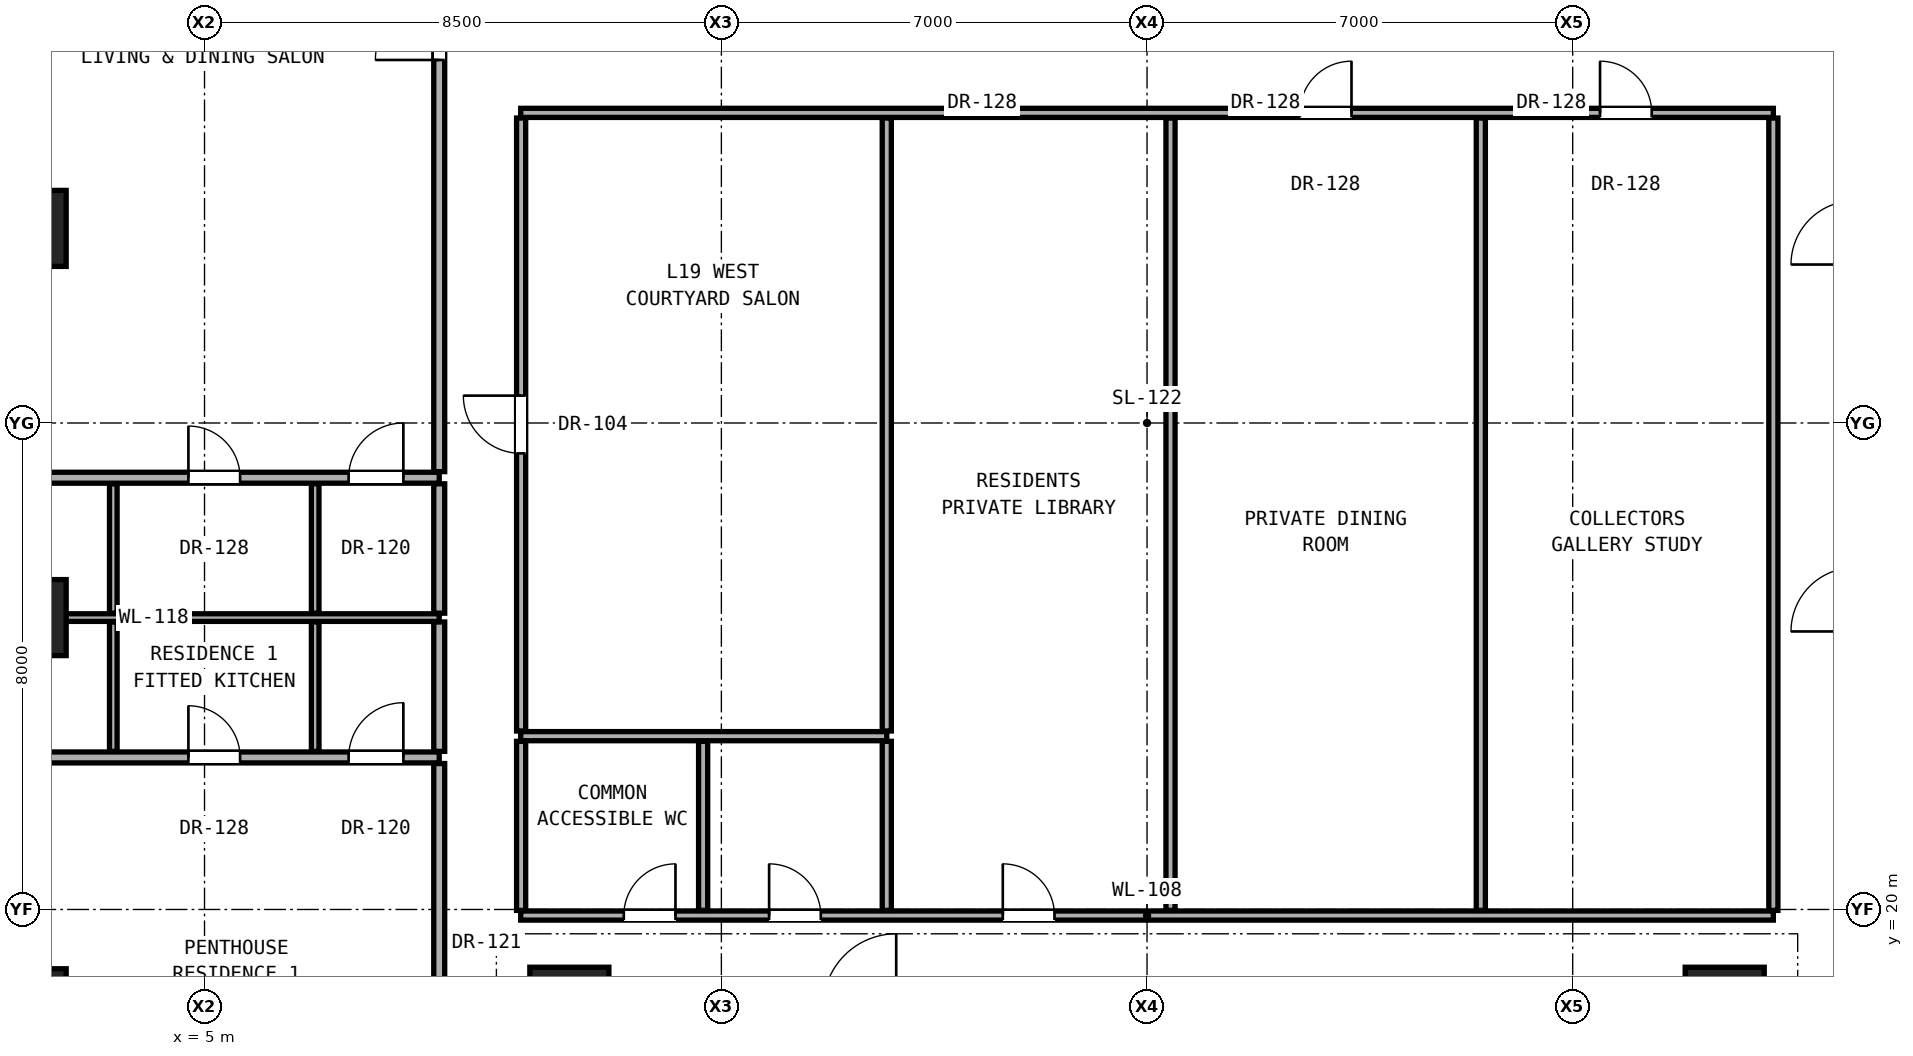
"""IFC4 building model, lengths in metres.
Left out: names, types, materials, properties, quantities, classifications, styles, units other than length and angle.
Written with IfcOpenShell. Run it as: python <this file> out.ifc"""

import sys

from ifc_helpers import new_model, si_unit, direction, frame, frame_2d, origin, origin_2d, place, context, subcontext, project, spatial, rectangle, hollow_rectangle, extrude, element, fill, save


model = new_model("IFC4")
c1 = context("Model", 3, precision=1e-05, world=origin(), true_north=direction((0.0, 1.0)))
c2 = subcontext(c1, "Body", "Model", "MODEL_VIEW")
j1 = project(units=[si_unit("LENGTHUNIT", "METRE"), si_unit("PLANEANGLEUNIT", "RADIAN")], contexts=[c1])
p1 = place(None, origin())
s1 = spatial("IfcSite", under=j1, at=p1, CompositionType="ELEMENT")
p2 = place(p1, origin())
s2 = spatial("IfcBuilding", under=s1, at=p2, CompositionType="ELEMENT")
p3 = place(p2, frame((0.0, 0.0, 68.6)))
s3 = spatial("IfcBuildingStorey", under=s2, at=p3, CompositionType="ELEMENT", Elevation=68.6)
for number, where, z_axis, x_axis in (
    (1, (11.0, 18.4, 0.0), (0.0, 0.0, 1.0), (1.0, 0.0, 0.0)),
    (2, (30.0, 18.4, 0.0), (0.0, 0.0, 1.0), (1.0, 0.0, 0.0)),
):
    element("IfcColumn", number, at=place(p3, frame(where, z_axis=z_axis, x_axis=x_axis)), inside=s3, PredefinedType="COLUMN", context=c2, shape_type="SweptSolid", body=[
        extrude(rectangle(XDim=1.3, YDim=1.3, at=origin_2d()), origin(), (0.0, 0.0, 1.0), 3.3),
    ])
for number, where, z_axis, x_axis in (
    (3, (2.1, 18.4, 0.0), (0.0, 0.0, 1.0), (1.0, 0.0, 0.0)),
    (4, (2.1, 24.8, 0.0), (0.0, 0.0, 1.0), (1.0, 0.0, 0.0)),
    (5, (2.1, 31.2, 0.0), (0.0, 0.0, 1.0), (1.0, 0.0, 0.0)),
):
    element("IfcColumn", number, at=place(p3, frame(where, z_axis=z_axis, x_axis=x_axis)), inside=s3, PredefinedType="COLUMN", context=c2, shape_type="SweptSolid", body=[
        extrude(hollow_rectangle(XDim=1.25, YDim=1.25, WallThickness=0.07, at=origin_2d()), origin(), (0.0, 0.0, 1.0), 3.3),
    ])
p4 = place(p3, frame((10.2, 19.9, 0.0), z_axis=(0.0, 0.0, 1.0), x_axis=(1.0, 0.0, 0.0)))
e6 = element("IfcWall", 6, at=p4, inside=s3, PredefinedType="PARTITIONING", context=c2, shape_type="SweptSolid", body=[
    extrude(rectangle(XDim=20.6, YDim=0.15, at=frame_2d((10.3, 0.0))), origin(), (0.0, 0.0, 1.0), 2.104),
])
p5 = place(p4, frame((1.695, 0.0, 0.0)))
e7 = element("IfcOpeningElement", 7, at=p5, cuts=e6, PredefinedType="OPENING", context=c2, shape_type="SweptSolid", body=[
    extrude(rectangle(XDim=0.85, YDim=2.01, at=frame_2d((0.425, 1.005))), frame((0.0, 0.085, 0.0), z_axis=(0.0, -1.0, 0.0), x_axis=(1.0, 0.0, 0.0)), (0.0, 0.0, 1.0), 0.17),
])
p6 = place(p4, frame((4.085, 0.0, 0.0)))
e8 = element("IfcOpeningElement", 8, at=p6, cuts=e6, PredefinedType="OPENING", context=c2, shape_type="SweptSolid", body=[
    extrude(rectangle(XDim=0.85, YDim=2.01, at=frame_2d((0.425, 1.005))), frame((0.0, 0.085, 0.0), z_axis=(0.0, -1.0, 0.0), x_axis=(1.0, 0.0, 0.0)), (0.0, 0.0, 1.0), 0.17),
])
p7 = place(p4, frame((7.928, 0.0, 0.0)))
e9 = element("IfcOpeningElement", 9, at=p7, cuts=e6, PredefinedType="OPENING", context=c2, shape_type="SweptSolid", body=[
    extrude(rectangle(XDim=0.85, YDim=2.01, at=frame_2d((0.425, 1.005))), frame((0.0, 0.085, 0.0), z_axis=(0.0, -1.0, 0.0), x_axis=(1.0, 0.0, 0.0)), (0.0, 0.0, 1.0), 0.17),
])
p8 = place(p3, frame((-1.48, 22.5, 0.0), z_axis=(0.0, 0.0, 1.0), x_axis=(1.0, 0.0, 0.0)))
e10 = element("IfcWall", 10, at=p8, inside=s3, PredefinedType="PARTITIONING", context=c2, shape_type="SweptSolid", body=[
    extrude(rectangle(XDim=10.34, YDim=0.18, at=frame_2d((5.17, 0.0))), origin(), (0.0, 0.0, 1.0), 2.125),
])
p9 = place(p8, frame((2.085, 0.0, 0.0)))
e11 = element("IfcOpeningElement", 11, at=p9, cuts=e10, PredefinedType="OPENING", context=c2, shape_type="SweptSolid", body=[
    extrude(rectangle(XDim=0.85, YDim=2.01, at=frame_2d((0.425, 1.005))), frame((0.0, 0.1, 0.0), z_axis=(0.0, -1.0, 0.0), x_axis=(1.0, 0.0, 0.0)), (0.0, 0.0, 1.0), 0.2),
])
p10 = place(p8, frame((6.215, 0.0, 0.0)))
e12 = element("IfcOpeningElement", 12, at=p10, cuts=e10, PredefinedType="OPENING", context=c2, shape_type="SweptSolid", body=[
    extrude(rectangle(XDim=0.85, YDim=2.01, at=frame_2d((0.425, 1.005))), frame((0.0, 0.1, 0.0), z_axis=(0.0, -1.0, 0.0), x_axis=(1.0, 0.0, 0.0)), (0.0, 0.0, 1.0), 0.2),
])
p11 = place(p8, frame((8.85, 0.0, 0.0)))
e13 = element("IfcOpeningElement", 13, at=p11, cuts=e10, PredefinedType="OPENING", context=c2, shape_type="SweptSolid", body=[
    extrude(rectangle(XDim=0.9, YDim=2.1, at=frame_2d((0.45, 1.05))), frame((0.0, 0.1, 0.0), z_axis=(0.0, -1.0, 0.0), x_axis=(1.0, 0.0, 0.0)), (0.0, 0.0, 1.0), 0.2),
])
p12 = place(p3, frame((10.2, 22.85, 0.0), z_axis=(0.0, 0.0, 1.0), x_axis=(1.0, 0.0, 0.0)))
e14 = element("IfcWall", 14, at=p12, inside=s3, PredefinedType="PARTITIONING", context=c2, shape_type="SweptSolid", body=[
    extrude(rectangle(XDim=6.02, YDim=0.15, at=frame_2d((3.01, 0.0))), origin(), (0.0, 0.0, 1.0), 2.104),
])
p13 = place(p3, frame((-1.48, 24.8, 0.0), z_axis=(0.0, 0.0, 1.0), x_axis=(1.0, 0.0, 0.0)))
e15 = element("IfcWall", 15, at=p13, inside=s3, PredefinedType="PARTITIONING", context=c2, shape_type="SweptSolid", body=[
    extrude(rectangle(XDim=10.34, YDim=0.125, at=frame_2d((5.17, 0.0))), origin(), (0.0, 0.0, 1.0), 2.125),
])
p14 = place(p3, frame((-1.48, 27.1, 0.0), z_axis=(0.0, 0.0, 1.0), x_axis=(1.0, 0.0, 0.0)))
e16 = element("IfcWall", 16, at=p14, inside=s3, PredefinedType="PARTITIONING", context=c2, shape_type="SweptSolid", body=[
    extrude(rectangle(XDim=10.34, YDim=0.18, at=frame_2d((5.17, 0.0))), origin(), (0.0, 0.0, 1.0), 2.125),
])
p15 = place(p14, frame((2.085, 0.0, 0.0)))
e17 = element("IfcOpeningElement", 17, at=p15, cuts=e16, PredefinedType="OPENING", context=c2, shape_type="SweptSolid", body=[
    extrude(rectangle(XDim=0.85, YDim=2.01, at=frame_2d((0.425, 1.005))), frame((0.0, 0.1, 0.0), z_axis=(0.0, -1.0, 0.0), x_axis=(1.0, 0.0, 0.0)), (0.0, 0.0, 1.0), 0.2),
])
p16 = place(p14, frame((6.215, 0.0, 0.0)))
e18 = element("IfcOpeningElement", 18, at=p16, cuts=e16, PredefinedType="OPENING", context=c2, shape_type="SweptSolid", body=[
    extrude(rectangle(XDim=0.85, YDim=2.01, at=frame_2d((0.425, 1.005))), frame((0.0, 0.1, 0.0), z_axis=(0.0, -1.0, 0.0), x_axis=(1.0, 0.0, 0.0)), (0.0, 0.0, 1.0), 0.2),
])
p17 = place(p14, frame((8.85, 0.0, 0.0)))
e19 = element("IfcOpeningElement", 19, at=p17, cuts=e16, PredefinedType="OPENING", context=c2, shape_type="SweptSolid", body=[
    extrude(rectangle(XDim=0.9, YDim=2.1, at=frame_2d((0.45, 1.05))), frame((0.0, 0.1, 0.0), z_axis=(0.0, -1.0, 0.0), x_axis=(1.0, 0.0, 0.0)), (0.0, 0.0, 1.0), 0.2),
])
p18 = place(p3, frame((10.2, 33.1, 0.0), z_axis=(0.0, 0.0, 1.0), x_axis=(1.0, 0.0, 0.0)))
e20 = element("IfcWall", 20, at=p18, inside=s3, PredefinedType="PARTITIONING", context=c2, shape_type="SweptSolid", body=[
    extrude(rectangle(XDim=20.6, YDim=0.15, at=frame_2d((10.3, 0.0))), origin(), (0.0, 0.0, 1.0), 2.104),
])
p19 = place(p18, frame((12.812, 0.0, 0.0)))
e21 = element("IfcOpeningElement", 21, at=p19, cuts=e20, PredefinedType="OPENING", context=c2, shape_type="SweptSolid", body=[
    extrude(rectangle(XDim=0.85, YDim=2.01, at=frame_2d((0.425, 1.005))), frame((0.0, 0.085, 0.0), z_axis=(0.0, -1.0, 0.0), x_axis=(1.0, 0.0, 0.0)), (0.0, 0.0, 1.0), 0.17),
])
p20 = place(p18, frame((17.75, 0.0, 0.0)))
e22 = element("IfcOpeningElement", 22, at=p20, cuts=e20, PredefinedType="OPENING", context=c2, shape_type="SweptSolid", body=[
    extrude(rectangle(XDim=0.85, YDim=2.01, at=frame_2d((0.425, 1.005))), frame((0.0, 0.085, 0.0), z_axis=(0.0, -1.0, 0.0), x_axis=(1.0, 0.0, 0.0)), (0.0, 0.0, 1.0), 0.17),
])
for number, where, z_axis, x_axis in (
    (23, (3.5, 22.6, 0.0), (0.0, 0.0, 1.0), (0.0, 1.0, 0.0)),
    (24, (3.5, 24.873, 0.0), (0.0, 0.0, 1.0), (0.0, 1.0, 0.0)),
    (25, (6.82, 22.6, 0.0), (0.0, 0.0, 1.0), (0.0, 1.0, 0.0)),
    (26, (6.82, 24.873, 0.0), (0.0, 0.0, 1.0), (0.0, 1.0, 0.0)),
):
    element("IfcWall", number, at=place(p3, frame(where, z_axis=z_axis, x_axis=x_axis)), inside=s3, PredefinedType="PARTITIONING", context=c2, shape_type="SweptSolid", body=[
        extrude(rectangle(XDim=2.127, YDim=0.125, at=frame_2d((1.064, 0.0))), origin(), (0.0, 0.0, 1.0), 2.279),
    ])
p21 = place(p3, frame((8.86, 14.21, 0.0), z_axis=(0.0, 0.0, 1.0), x_axis=(0.0, 1.0, 0.0)))
e27 = element("IfcWall", 27, at=p21, inside=s3, PredefinedType="PARTITIONING", context=c2, shape_type="SweptSolid", body=[
    extrude(rectangle(XDim=8.19, YDim=0.18, at=frame_2d((4.095, 0.0))), origin(), (0.0, 0.0, 1.0), 2.436),
])
p22 = place(p21, frame((3.57, 0.0, 0.0)))
e28 = element("IfcOpeningElement", 28, at=p22, cuts=e27, PredefinedType="OPENING", context=c2, shape_type="SweptSolid", body=[
    extrude(rectangle(XDim=1.05, YDim=2.2, at=frame_2d((0.525, 1.1))), frame((0.0, 0.1, 0.0), z_axis=(0.0, -1.0, 0.0), x_axis=(1.0, 0.0, 0.0)), (0.0, 0.0, 1.0), 0.2),
])
for number, where, z_axis, x_axis in (
    (29, (8.86, 22.6, 0.0), (0.0, 0.0, 1.0), (0.0, 1.0, 0.0)),
    (30, (8.86, 24.873, 0.0), (0.0, 0.0, 1.0), (0.0, 1.0, 0.0)),
):
    element("IfcWall", number, at=place(p3, frame(where, z_axis=z_axis, x_axis=x_axis)), inside=s3, PredefinedType="PARTITIONING", context=c2, shape_type="SweptSolid", body=[
        extrude(rectangle(XDim=2.127, YDim=0.18, at=frame_2d((1.064, 0.0))), origin(), (0.0, 0.0, 1.0), 2.279),
    ])
p23 = place(p3, frame((8.86, 27.2, 0.0), z_axis=(0.0, 0.0, 1.0), x_axis=(0.0, 1.0, 0.0)))
e31 = element("IfcWall", 31, at=p23, inside=s3, PredefinedType="PARTITIONING", context=c2, shape_type="SweptSolid", body=[
    extrude(rectangle(XDim=14.59, YDim=0.18, at=frame_2d((7.295, 0.0))), origin(), (0.0, 0.0, 1.0), 2.279),
])
p24 = place(p23, frame((6.77, 0.0, 0.0)))
e32 = element("IfcOpeningElement", 32, at=p24, cuts=e31, PredefinedType="OPENING", context=c2, shape_type="SweptSolid", body=[
    extrude(rectangle(XDim=1.05, YDim=2.2, at=frame_2d((0.525, 1.1))), frame((0.0, 0.1, 0.0), z_axis=(0.0, -1.0, 0.0), x_axis=(1.0, 0.0, 0.0)), (0.0, 0.0, 1.0), 0.2),
])
p25 = place(p3, frame((10.207, 19.985, 0.0), z_axis=(0.0, 0.0, 1.0), x_axis=(0.0, 1.0, 0.0)))
e33 = element("IfcWall", 33, at=p25, inside=s3, PredefinedType="PARTITIONING", context=c2, shape_type="SweptSolid", body=[
    extrude(rectangle(XDim=2.78, YDim=0.15, at=frame_2d((1.39, 0.0))), origin(), (0.0, 0.0, 1.0), 3.06),
])
p26 = place(p3, frame((10.207, 22.935, 0.0), z_axis=(0.0, 0.0, 1.0), x_axis=(0.0, 1.0, 0.0)))
e34 = element("IfcWall", 34, at=p26, inside=s3, PredefinedType="PARTITIONING", context=c2, shape_type="SweptSolid", body=[
    extrude(rectangle(XDim=10.08, YDim=0.15, at=frame_2d((5.04, 0.0))), origin(), (0.0, 0.0, 1.0), 2.279),
])
p27 = place(p26, frame((4.565, 0.0, 0.0)))
e35 = element("IfcOpeningElement", 35, at=p27, cuts=e34, PredefinedType="OPENING", context=c2, shape_type="SweptSolid", body=[
    extrude(rectangle(XDim=0.95, YDim=2.15, at=frame_2d((0.475, 1.075))), frame((0.0, 0.085, 0.0), z_axis=(0.0, -1.0, 0.0), x_axis=(1.0, 0.0, 0.0)), (0.0, 0.0, 1.0), 0.17),
])
for number, where, z_axis, x_axis in (
    (36, (13.2, 19.985, 0.0), (0.0, 0.0, 1.0), (0.0, 1.0, 0.0)),
    (37, (16.22, 19.985, 0.0), (0.0, 0.0, 1.0), (0.0, 1.0, 0.0)),
):
    element("IfcWall", number, at=place(p3, frame(where, z_axis=z_axis, x_axis=x_axis)), inside=s3, PredefinedType="PARTITIONING", context=c2, shape_type="SweptSolid", body=[
        extrude(rectangle(XDim=2.78, YDim=0.15, at=frame_2d((1.39, 0.0))), origin(), (0.0, 0.0, 1.0), 3.06),
    ])
p28 = place(p3, frame((16.22, 22.935, 0.0), z_axis=(0.0, 0.0, 1.0), x_axis=(0.0, 1.0, 0.0)))
e38 = element("IfcWall", 38, at=p28, inside=s3, PredefinedType="PARTITIONING", context=c2, shape_type="SweptSolid", body=[
    extrude(rectangle(XDim=10.08, YDim=0.15, at=frame_2d((5.04, 0.0))), origin(), (0.0, 0.0, 1.0), 2.104),
])
for number, where, z_axis, x_axis in (
    (39, (20.886, 19.985, 0.0), (0.0, 0.0, 1.0), (0.0, 1.0, 0.0)),
    (40, (25.989, 19.985, 0.0), (0.0, 0.0, 1.0), (0.0, 1.0, 0.0)),
):
    element("IfcWall", number, at=place(p3, frame(where, z_axis=z_axis, x_axis=x_axis)), inside=s3, PredefinedType="PARTITIONING", context=c2, shape_type="SweptSolid", body=[
        extrude(rectangle(XDim=13.03, YDim=0.15, at=frame_2d((6.515, 0.0))), origin(), (0.0, 0.0, 1.0), 2.104),
    ])
p29 = place(p3, frame((30.8, 19.985, 0.0), z_axis=(0.0, 0.0, 1.0), x_axis=(0.0, 1.0, 0.0)))
e41 = element("IfcWall", 41, at=p29, inside=s3, PredefinedType="PARTITIONING", context=c2, shape_type="SweptSolid", body=[
    extrude(rectangle(XDim=13.03, YDim=0.15, at=frame_2d((6.515, 0.0))), origin(), (0.0, 0.0, 1.0), 2.279),
])
p30 = place(p5, origin())
e42 = element("IfcDoor", 42, at=p30, inside=s3, OperationType="SINGLE_SWING_RIGHT", PredefinedType="DOOR", context=c2, shape_type="SweptSolid", body=[
    extrude(rectangle(XDim=0.85, YDim=2.01, at=frame_2d((0.425, 1.005))), frame((0.0, 0.025, 0.0), z_axis=(0.0, -1.0, 0.0), x_axis=(1.0, 0.0, 0.0)), (0.0, 0.0, 1.0), 0.05),
])
fill(e7, e42)
p31 = place(p10, origin())
e43 = element("IfcDoor", 43, at=p31, inside=s3, OperationType="SINGLE_SWING_LEFT", PredefinedType="DOOR", context=c2, shape_type="SweptSolid", body=[
    extrude(rectangle(XDim=0.85, YDim=2.01, at=frame_2d((0.425, 1.005))), frame((0.0, 0.025, 0.0), z_axis=(0.0, -1.0, 0.0), x_axis=(1.0, 0.0, 0.0)), (0.0, 0.0, 1.0), 0.05),
])
fill(e12, e43)
p32 = place(p11, origin())
e44 = element("IfcDoor", 44, at=p32, inside=s3, OperationType="SINGLE_SWING_RIGHT", PredefinedType="DOOR", context=c2, shape_type="SweptSolid", body=[
    extrude(rectangle(XDim=0.9, YDim=2.1, at=frame_2d((0.45, 1.05))), frame((0.0, 0.025, 0.0), z_axis=(0.0, -1.0, 0.0), x_axis=(1.0, 0.0, 0.0)), (0.0, 0.0, 1.0), 0.05),
])
fill(e13, e44)
p33 = place(p24, origin())
e45 = element("IfcDoor", 45, at=p33, inside=s3, OperationType="SINGLE_SWING_LEFT", PredefinedType="DOOR", context=c2, shape_type="SweptSolid", body=[
    extrude(rectangle(XDim=1.05, YDim=2.2, at=frame_2d((0.525, 1.1))), frame((0.0, 0.025, 0.0), z_axis=(0.0, -1.0, 0.0), x_axis=(1.0, 0.0, 0.0)), (0.0, 0.0, 1.0), 0.05),
])
fill(e32, e45)
p34 = place(p16, origin())
e46 = element("IfcDoor", 46, at=p34, inside=s3, OperationType="SINGLE_SWING_LEFT", PredefinedType="DOOR", context=c2, shape_type="SweptSolid", body=[
    extrude(rectangle(XDim=0.85, YDim=2.01, at=frame_2d((0.425, 1.005))), frame((0.0, 0.025, 0.0), z_axis=(0.0, -1.0, 0.0), x_axis=(1.0, 0.0, 0.0)), (0.0, 0.0, 1.0), 0.05),
])
fill(e18, e46)
p35 = place(p17, origin())
e47 = element("IfcDoor", 47, at=p35, inside=s3, OperationType="SINGLE_SWING_RIGHT", PredefinedType="DOOR", context=c2, shape_type="SweptSolid", body=[
    extrude(rectangle(XDim=0.9, YDim=2.1, at=frame_2d((0.45, 1.05))), frame((0.0, 0.025, 0.0), z_axis=(0.0, -1.0, 0.0), x_axis=(1.0, 0.0, 0.0)), (0.0, 0.0, 1.0), 0.05),
])
fill(e19, e47)
p36 = place(p6, origin())
e48 = element("IfcDoor", 48, at=p36, inside=s3, OperationType="SINGLE_SWING_LEFT", PredefinedType="DOOR", context=c2, shape_type="SweptSolid", body=[
    extrude(rectangle(XDim=0.85, YDim=2.01, at=frame_2d((0.425, 1.005))), frame((0.0, 0.025, 0.0), z_axis=(0.0, -1.0, 0.0), x_axis=(1.0, 0.0, 0.0)), (0.0, 0.0, 1.0), 0.05),
])
fill(e8, e48)
p37 = place(p27, origin())
e49 = element("IfcDoor", 49, at=p37, inside=s3, OperationType="SINGLE_SWING_RIGHT", PredefinedType="DOOR", context=c2, shape_type="SweptSolid", body=[
    extrude(rectangle(XDim=0.95, YDim=2.15, at=frame_2d((0.475, 1.075))), frame((0.0, 0.025, 0.0), z_axis=(0.0, -1.0, 0.0), x_axis=(1.0, 0.0, 0.0)), (0.0, 0.0, 1.0), 0.05),
])
fill(e35, e49)
p38 = place(p7, origin())
e50 = element("IfcDoor", 50, at=p38, inside=s3, OperationType="SINGLE_SWING_LEFT", PredefinedType="DOOR", context=c2, shape_type="SweptSolid", body=[
    extrude(rectangle(XDim=0.85, YDim=2.01, at=frame_2d((0.425, 1.005))), frame((0.0, 0.025, 0.0), z_axis=(0.0, -1.0, 0.0), x_axis=(1.0, 0.0, 0.0)), (0.0, 0.0, 1.0), 0.05),
])
fill(e9, e50)
p39 = place(p19, origin())
e51 = element("IfcDoor", 51, at=p39, inside=s3, OperationType="SINGLE_SWING_RIGHT", PredefinedType="DOOR", context=c2, shape_type="SweptSolid", body=[
    extrude(rectangle(XDim=0.85, YDim=2.01, at=frame_2d((0.425, 1.005))), frame((0.0, 0.025, 0.0), z_axis=(0.0, -1.0, 0.0), x_axis=(1.0, 0.0, 0.0)), (0.0, 0.0, 1.0), 0.05),
])
fill(e21, e51)
p40 = place(p20, origin())
e52 = element("IfcDoor", 52, at=p40, inside=s3, OperationType="SINGLE_SWING_LEFT", PredefinedType="DOOR", context=c2, shape_type="SweptSolid", body=[
    extrude(rectangle(XDim=0.85, YDim=2.01, at=frame_2d((0.425, 1.005))), frame((0.0, 0.025, 0.0), z_axis=(0.0, -1.0, 0.0), x_axis=(1.0, 0.0, 0.0)), (0.0, 0.0, 1.0), 0.05),
])
fill(e22, e52)
save(model, sys.argv[1])
